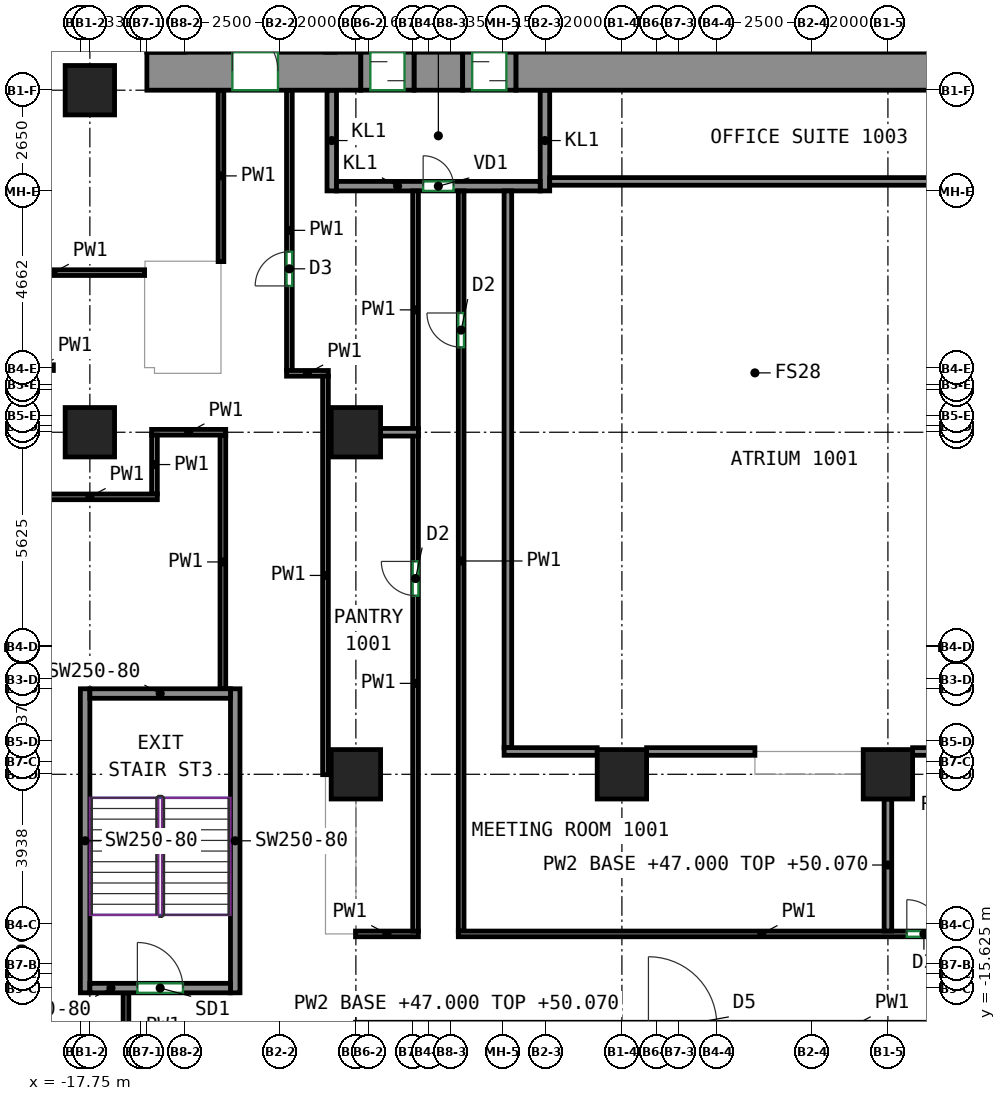
"""IFC4 building model, lengths in metres.
Left out: names, types, materials, properties, quantities, classifications, styles, units other than length and angle.
Written with IfcOpenShell. Run it as: python <this file> out.ifc"""

import sys

from ifc_helpers import new_model, si_unit, direction, frame, frame_2d, origin, origin_2d, place, context, subcontext, project, spatial, rectangle, extrude, source, transform, mapped, element, fill, save


model = new_model("IFC4")
c1 = context("Model", 3, precision=1e-05, world=origin(), true_north=direction((0.0, 1.0)))
c2 = subcontext(c1, "Body", "Model", "MODEL_VIEW")
j1 = project(units=[si_unit("LENGTHUNIT", "METRE"), si_unit("PLANEANGLEUNIT", "RADIAN")], contexts=[c1])
p1 = place(None, origin())
s1 = spatial("IfcSite", under=j1, at=p1, CompositionType="ELEMENT")
p2 = place(p1, origin())
s2 = spatial("IfcBuilding", under=s1, at=p2, CompositionType="ELEMENT")
p3 = place(p2, frame((0.0, 0.0, 47.0)))
s3 = spatial("IfcBuildingStorey", under=s2, at=p3, CompositionType="ELEMENT", Elevation=47.0)
m1 = source(origin(), c2, "Body", "SweptSolid", [
    extrude(rectangle(XDim=1.3, YDim=1.3, at=origin_2d()), origin(), (0.0, 0.0, 1.0), 3.72),
])
for number, where, z_axis, x_axis in (
    (1, (-17.5, -1.0, 0.0), (0.0, 0.0, 1.0), (1.0, 0.0, 0.0)),
    (2, (-17.5, 8.0, 0.0), (0.0, 0.0, 1.0), (1.0, 0.0, 0.0)),
    (3, (-10.5, -10.0, 0.0), (0.0, 0.0, 1.0), (1.0, 0.0, 0.0)),
    (4, (-10.5, -1.0, 0.0), (0.0, 0.0, 1.0), (1.0, 0.0, 0.0)),
    (5, (-3.5, -10.0, 0.0), (0.0, 0.0, 1.0), (1.0, 0.0, 0.0)),
    (6, (3.5, -10.0, 0.0), (0.0, 0.0, 1.0), (1.0, 0.0, 0.0)),
):
    element("IfcColumn", number, at=place(p3, frame(where, z_axis=z_axis, x_axis=x_axis)), inside=s3, PredefinedType="COLUMN", context=c2, shape_type="MappedRepresentation", body=[
        mapped(m1, transform((0.0, 0.0, 0.0))),
    ])
m2 = source(origin(), c2, "Body", "SweptSolid", [
    extrude(rectangle(XDim=5.63, YDim=1.0, at=frame_2d((2.815, 0.0))), origin(), (0.0, 0.0, 1.0), 3.72),
])
p4 = place(p3, frame((-16.0, 8.5, 0.0), z_axis=(0.0, 0.0, 1.0), x_axis=(1.0, 0.0, 0.0)))
e7 = element("IfcWall", 7, at=p4, inside=s3, PredefinedType="SHEAR", context=c2, shape_type="MappedRepresentation", body=[
    mapped(m2, transform((0.0, 0.0, 0.0))),
])
p5 = place(p4, frame((2.25, 0.0, 0.0)))
e8 = element("IfcOpeningElement", 8, at=p5, cuts=e7, PredefinedType="OPENING", context=c2, shape_type="SweptSolid", body=[
    extrude(rectangle(XDim=1.2, YDim=2.1, at=frame_2d((0.6, 1.05))), frame((0.0, 0.51, 0.0), z_axis=(0.0, -1.0, 0.0), x_axis=(1.0, 0.0, 0.0)), (0.0, 0.0, 1.0), 1.02),
])
m3 = source(origin(), c2, "Body", "SweptSolid", [
    extrude(rectangle(XDim=1.28, YDim=1.0, at=frame_2d((0.64, 0.0))), origin(), (0.0, 0.0, 1.0), 3.72),
])
p6 = place(p3, frame((-8.97, 8.5, 0.0), z_axis=(0.0, 0.0, 1.0), x_axis=(1.0, 0.0, 0.0)))
e9 = element("IfcWall", 9, at=p6, inside=s3, PredefinedType="SHEAR", context=c2, shape_type="MappedRepresentation", body=[
    mapped(m3, transform((0.0, 0.0, 0.0))),
])
m4 = source(origin(), c2, "Body", "SweptSolid", [
    extrude(rectangle(XDim=14.18, YDim=1.0, at=frame_2d((7.09, 0.0))), origin(), (0.0, 0.0, 1.0), 3.72),
])
p7 = place(p3, frame((-6.29, 8.5, 0.0), z_axis=(0.0, 0.0, 1.0), x_axis=(1.0, 0.0, 0.0)))
e10 = element("IfcWall", 10, at=p7, inside=s3, PredefinedType="SHEAR", context=c2, shape_type="MappedRepresentation", body=[
    mapped(m4, transform((0.0, 0.0, 0.0))),
])
m5 = source(origin(), c2, "Body", "SweptSolid", [
    extrude(rectangle(XDim=8.0, YDim=0.25, at=frame_2d((4.0, 0.0))), origin(), (0.0, 0.0, 1.0), 3.72),
])
for number, where, z_axis, x_axis in (
    (11, (-17.625, -15.75, 0.0), (0.0, 0.0, 1.0), (0.0, 1.0, 0.0)),
    (12, (-13.675, -15.75, 0.0), (0.0, 0.0, 1.0), (0.0, 1.0, 0.0)),
):
    element("IfcWall", number, at=place(p3, frame(where, z_axis=z_axis, x_axis=x_axis)), inside=s3, PredefinedType="SHEAR", context=c2, shape_type="MappedRepresentation", body=[
        mapped(m5, transform((0.0, 0.0, 0.0))),
    ])
m6 = source(origin(), c2, "Body", "SweptSolid", [
    extrude(rectangle(XDim=3.7, YDim=0.25, at=frame_2d((1.85, 0.0))), origin(), (0.0, 0.0, 1.0), 3.72),
])
p8 = place(p3, frame((-17.5, -15.625, 0.0), z_axis=(0.0, 0.0, 1.0), x_axis=(1.0, 0.0, 0.0)))
e13 = element("IfcWall", 13, at=p8, inside=s3, PredefinedType="SHEAR", context=c2, shape_type="MappedRepresentation", body=[
    mapped(m6, transform((0.0, 0.0, 0.0))),
])
p9 = place(p8, frame((1.25, 0.0, 0.0)))
e14 = element("IfcOpeningElement", 14, at=p9, cuts=e13, PredefinedType="OPENING", context=c2, shape_type="SweptSolid", body=[
    extrude(rectangle(XDim=1.2, YDim=2.1, at=frame_2d((0.6, 1.05))), frame((0.0, 0.135, 0.0), z_axis=(0.0, -1.0, 0.0), x_axis=(1.0, 0.0, 0.0)), (0.0, 0.0, 1.0), 0.27),
])
p10 = place(p3, frame((-17.5, -7.875, 0.0), z_axis=(0.0, 0.0, 1.0), x_axis=(1.0, 0.0, 0.0)))
e15 = element("IfcWall", 15, at=p10, inside=s3, PredefinedType="SHEAR", context=c2, shape_type="MappedRepresentation", body=[
    mapped(m6, transform((0.0, 0.0, 0.0))),
])
m7 = source(origin(), c2, "Body", "SweptSolid", [
    extrude(rectangle(XDim=2.65, YDim=0.25, at=frame_2d((1.325, 0.0))), origin(), (0.0, 0.0, 1.0), 3.72),
])
for number, where, z_axis, x_axis in (
    (16, (-11.135, 5.35, 0.0), (0.0, 0.0, 1.0), (0.0, 1.0, 0.0)),
    (17, (-5.525, 5.35, 0.0), (0.0, 0.0, 1.0), (0.0, 1.0, 0.0)),
):
    element("IfcWall", number, at=place(p3, frame(where, z_axis=z_axis, x_axis=x_axis)), inside=s3, PredefinedType="PARTITIONING", context=c2, shape_type="MappedRepresentation", body=[
        mapped(m7, transform((0.0, 0.0, 0.0))),
    ])
m8 = source(origin(), c2, "Body", "SweptSolid", [
    extrude(rectangle(XDim=5.36, YDim=0.25, at=frame_2d((2.68, 0.0))), origin(), (0.0, 0.0, 1.0), 3.72),
])
p11 = place(p3, frame((-11.01, 5.475, 0.0), z_axis=(0.0, 0.0, 1.0), x_axis=(1.0, 0.0, 0.0)))
e18 = element("IfcWall", 18, at=p11, inside=s3, PredefinedType="PARTITIONING", context=c2, shape_type="MappedRepresentation", body=[
    mapped(m8, transform((0.0, 0.0, 0.0))),
])
p12 = place(p11, frame((2.28, 0.0, 0.0)))
e19 = element("IfcOpeningElement", 19, at=p12, cuts=e18, PredefinedType="OPENING", context=c2, shape_type="SweptSolid", body=[
    extrude(rectangle(XDim=0.8, YDim=2.0, at=frame_2d((0.4, 1.0))), frame((0.0, 0.135, 0.0), z_axis=(0.0, -1.0, 0.0), x_axis=(1.0, 0.0, 0.0)), (0.0, 0.0, 1.0), 0.27),
])
m9 = source(origin(), c2, "Body", "SweptSolid", [
    extrude(rectangle(XDim=1.4, YDim=1.0, at=frame_2d((0.7, 0.0))), origin(), (0.0, 0.0, 1.0), 2.7),
])
p13 = place(p3, frame((-10.37, 8.5, 0.0), z_axis=(0.0, 0.0, 1.0), x_axis=(1.0, 0.0, 0.0)))
e20 = element("IfcWall", 20, at=p13, inside=s3, PredefinedType="PARTITIONING", context=c2, shape_type="MappedRepresentation", body=[
    mapped(m9, transform((0.0, 0.0, 0.0))),
])
p14 = place(p13, frame((0.25, 0.0, 0.0)))
e21 = element("IfcOpeningElement", 21, at=p14, cuts=e20, PredefinedType="OPENING", context=c2, shape_type="SweptSolid", body=[
    extrude(rectangle(XDim=0.9, YDim=2.1, at=frame_2d((0.45, 1.05))), frame((0.0, 0.51, 0.0), z_axis=(0.0, -1.0, 0.0), x_axis=(1.0, 0.0, 0.0)), (0.0, 0.0, 1.0), 1.02),
])
m10 = source(origin(), c2, "Body", "SweptSolid", [
    extrude(rectangle(XDim=1.4, YDim=1.0, at=frame_2d((0.7, 0.0))), origin(), (0.0, 0.0, 1.0), 2.7),
])
p15 = place(p3, frame((-7.69, 8.5, 0.0), z_axis=(0.0, 0.0, 1.0), x_axis=(1.0, 0.0, 0.0)))
e22 = element("IfcWall", 22, at=p15, inside=s3, PredefinedType="PARTITIONING", context=c2, shape_type="MappedRepresentation", body=[
    mapped(m10, transform((0.0, 0.0, 0.0))),
])
p16 = place(p15, frame((0.25, 0.0, 0.0)))
e23 = element("IfcOpeningElement", 23, at=p16, cuts=e22, PredefinedType="OPENING", context=c2, shape_type="SweptSolid", body=[
    extrude(rectangle(XDim=0.9, YDim=2.1, at=frame_2d((0.45, 1.05))), frame((0.0, 0.51, 0.0), z_axis=(0.0, -1.0, 0.0), x_axis=(1.0, 0.0, 0.0)), (0.0, 0.0, 1.0), 1.02),
])
p17 = place(p3, frame((-20.875, 3.2, 0.0), z_axis=(0.0, 0.0, 1.0), x_axis=(1.0, 0.0, 0.0)))
e24 = element("IfcWall", 24, at=p17, inside=s3, PredefinedType="PARTITIONING", context=c2, shape_type="SweptSolid", body=[
    extrude(rectangle(XDim=4.815, YDim=0.15, at=frame_2d((2.407, 0.0))), origin(), (0.0, 0.0, 1.0), 3.72),
])
p18 = place(p3, frame((-14.05, 8.0, 0.0), z_axis=(0.0, 0.0, 1.0), x_axis=(0.0, -1.0, 0.0)))
e25 = element("IfcWall", 25, at=p18, inside=s3, PredefinedType="PARTITIONING", context=c2, shape_type="SweptSolid", body=[
    extrude(rectangle(XDim=4.51, YDim=0.15, at=frame_2d((2.255, 0.0))), origin(), (0.0, 0.0, 1.0), 3.72),
])
p19 = place(p3, frame((-12.25, 0.625, 0.0), z_axis=(0.0, 0.0, 1.0), x_axis=(0.0, 1.0, 0.0)))
e26 = element("IfcWall", 26, at=p19, inside=s3, PredefinedType="PARTITIONING", context=c2, shape_type="SweptSolid", body=[
    extrude(rectangle(XDim=7.375, YDim=0.15, at=frame_2d((3.688, 0.0))), origin(), (0.0, 0.0, 1.0), 3.72),
])
p20 = place(p19, frame((2.225, 0.0, 0.0)))
e27 = element("IfcOpeningElement", 27, at=p20, cuts=e26, PredefinedType="OPENING", context=c2, shape_type="SweptSolid", body=[
    extrude(rectangle(XDim=0.9, YDim=2.1, at=frame_2d((0.45, 1.05))), frame((0.0, 0.085, 0.0), z_axis=(0.0, -1.0, 0.0), x_axis=(1.0, 0.0, 0.0)), (0.0, 0.0, 1.0), 0.17),
])
p21 = place(p3, frame((-12.325, 0.55, 0.0), z_axis=(0.0, 0.0, 1.0), x_axis=(1.0, 0.0, 0.0)))
e28 = element("IfcWall", 28, at=p21, inside=s3, PredefinedType="PARTITIONING", context=c2, shape_type="SweptSolid", body=[
    extrude(rectangle(XDim=1.1, YDim=0.15, at=frame_2d((0.55, 0.0))), origin(), (0.0, 0.0, 1.0), 3.72),
])
p22 = place(p3, frame((-8.93, -0.91, 0.0), z_axis=(0.0, 0.0, 1.0), x_axis=(0.0, 1.0, 0.0)))
e29 = element("IfcWall", 29, at=p22, inside=s3, PredefinedType="PARTITIONING", context=c2, shape_type="SweptSolid", body=[
    extrude(rectangle(XDim=6.26, YDim=0.15, at=frame_2d((3.13, 0.0))), origin(), (0.0, 0.0, 1.0), 3.72),
])
p23 = place(p3, frame((-7.73, -14.125, 0.0), z_axis=(0.0, 0.0, 1.0), x_axis=(0.0, 1.0, 0.0)))
e30 = element("IfcWall", 30, at=p23, inside=s3, PredefinedType="PARTITIONING", context=c2, shape_type="SweptSolid", body=[
    extrude(rectangle(XDim=19.475, YDim=0.15, at=frame_2d((9.738, 0.0))), origin(), (0.0, 0.0, 1.0), 3.72),
])
p24 = place(p23, frame((15.363, 0.0, 0.0)))
e31 = element("IfcOpeningElement", 31, at=p24, cuts=e30, PredefinedType="OPENING", context=c2, shape_type="SweptSolid", body=[
    extrude(rectangle(XDim=0.9, YDim=2.1, at=frame_2d((0.45, 1.05))), frame((0.0, 0.085, 0.0), z_axis=(0.0, -1.0, 0.0), x_axis=(1.0, 0.0, 0.0)), (0.0, 0.0, 1.0), 0.17),
])
p25 = place(p3, frame((-7.805, -14.2, 0.0), z_axis=(0.0, 0.0, 1.0), x_axis=(1.0, 0.0, 0.0)))
e32 = element("IfcWall", 32, at=p25, inside=s3, PredefinedType="PARTITIONING", context=c2, shape_type="SweptSolid", body=[
    extrude(rectangle(XDim=15.97, YDim=0.15, at=frame_2d((7.985, 0.0))), origin(), (0.0, 0.0, 1.0), 3.72),
])
p26 = place(p25, frame((11.802, 0.0, 0.0)))
e33 = element("IfcOpeningElement", 33, at=p26, cuts=e32, PredefinedType="OPENING", context=c2, shape_type="SweptSolid", body=[
    extrude(rectangle(XDim=0.9, YDim=2.1, at=frame_2d((0.45, 1.05))), frame((0.0, 0.085, 0.0), z_axis=(0.0, -1.0, 0.0), x_axis=(1.0, 0.0, 0.0)), (0.0, 0.0, 1.0), 0.17),
])
p27 = place(p3, frame((-11.3, -10.01, 0.0), z_axis=(0.0, 0.0, 1.0), x_axis=(0.0, 1.0, 0.0)))
e34 = element("IfcWall", 34, at=p27, inside=s3, PredefinedType="PARTITIONING", context=c2, shape_type="SweptSolid", body=[
    extrude(rectangle(XDim=10.485, YDim=0.15, at=frame_2d((5.243, 0.0))), origin(), (0.0, 0.0, 1.0), 3.72),
])
p28 = place(p3, frame((-10.51, -14.2, 0.0), z_axis=(0.0, 0.0, 1.0), x_axis=(1.0, 0.0, 0.0)))
e35 = element("IfcWall", 35, at=p28, inside=s3, PredefinedType="PARTITIONING", context=c2, shape_type="SweptSolid", body=[
    extrude(rectangle(XDim=1.655, YDim=0.15, at=frame_2d((0.828, 0.0))), origin(), (0.0, 0.0, 1.0), 3.72),
])
p29 = place(p3, frame((-8.93, -14.125, 0.0), z_axis=(0.0, 0.0, 1.0), x_axis=(0.0, 1.0, 0.0)))
e36 = element("IfcWall", 36, at=p29, inside=s3, PredefinedType="PARTITIONING", context=c2, shape_type="SweptSolid", body=[
    extrude(rectangle(XDim=13.035, YDim=0.15, at=frame_2d((6.518, 0.0))), origin(), (0.0, 0.0, 1.0), 3.72),
])
p30 = place(p29, frame((8.826, 0.0, 0.0)))
e37 = element("IfcOpeningElement", 37, at=p30, cuts=e36, PredefinedType="OPENING", context=c2, shape_type="SweptSolid", body=[
    extrude(rectangle(XDim=0.9, YDim=2.1, at=frame_2d((0.45, 1.05))), frame((0.0, 0.085, 0.0), z_axis=(0.0, -1.0, 0.0), x_axis=(1.0, 0.0, 0.0)), (0.0, 0.0, 1.0), 0.17),
])
p31 = place(p3, frame((-16.55, -15.75, 0.0), z_axis=(0.0, 0.0, 1.0), x_axis=(0.0, -1.0, 0.0)))
e38 = element("IfcWall", 38, at=p31, inside=s3, PredefinedType="PARTITIONING", context=c2, shape_type="SweptSolid", body=[
    extrude(rectangle(XDim=1.725, YDim=0.15, at=frame_2d((0.863, 0.0))), origin(), (0.0, 0.0, 1.0), 3.72),
])
p32 = place(p3, frame((-14.0, -1.075, 0.0), z_axis=(0.0, 0.0, 1.0), x_axis=(0.0, -1.0, 0.0)))
e39 = element("IfcWall", 39, at=p32, inside=s3, PredefinedType="PARTITIONING", context=c2, shape_type="SweptSolid", body=[
    extrude(rectangle(XDim=6.675, YDim=0.15, at=frame_2d((3.337, 0.0))), origin(), (0.0, 0.0, 1.0), 3.72),
])
p33 = place(p3, frame((-15.875, -1.0, 0.0), z_axis=(0.0, 0.0, 1.0), x_axis=(1.0, 0.0, 0.0)))
e40 = element("IfcWall", 40, at=p33, inside=s3, PredefinedType="PARTITIONING", context=c2, shape_type="SweptSolid", body=[
    extrude(rectangle(XDim=1.95, YDim=0.15, at=frame_2d((0.975, 0.0))), origin(), (0.0, 0.0, 1.0), 3.72),
])
p34 = place(p3, frame((-15.8, -2.625, 0.0), z_axis=(0.0, 0.0, 1.0), x_axis=(0.0, 1.0, 0.0)))
e41 = element("IfcWall", 41, at=p34, inside=s3, PredefinedType="PARTITIONING", context=c2, shape_type="SweptSolid", body=[
    extrude(rectangle(XDim=1.55, YDim=0.15, at=frame_2d((0.775, 0.0))), origin(), (0.0, 0.0, 1.0), 3.72),
])
p35 = place(p3, frame((-19.275, -2.7, 0.0), z_axis=(0.0, 0.0, 1.0), x_axis=(1.0, 0.0, 0.0)))
e42 = element("IfcWall", 42, at=p35, inside=s3, PredefinedType="PARTITIONING", context=c2, shape_type="SweptSolid", body=[
    extrude(rectangle(XDim=3.55, YDim=0.15, at=frame_2d((1.775, 0.0))), origin(), (0.0, 0.0, 1.0), 3.72),
])
p36 = place(p3, frame((-19.275, 0.7, 0.0), z_axis=(0.0, 0.0, 1.0), x_axis=(1.0, 0.0, 0.0)))
e43 = element("IfcWall", 43, at=p36, inside=s3, PredefinedType="PARTITIONING", context=c2, shape_type="SweptSolid", body=[
    extrude(rectangle(XDim=0.815, YDim=0.15, at=frame_2d((0.407, 0.0))), origin(), (0.0, 0.0, 1.0), 3.72),
])
p37 = place(p3, frame((-9.85, -1.0, 0.0), z_axis=(0.0, 0.0, 1.0), x_axis=(1.0, 0.0, 0.0)))
e44 = element("IfcWall", 44, at=p37, inside=s3, PredefinedType="PARTITIONING", context=c2, shape_type="SweptSolid", body=[
    extrude(rectangle(XDim=0.994, YDim=0.2, at=frame_2d((0.497, 0.0))), origin(), (0.0, 0.0, 1.0), 3.72),
])
p38 = place(p3, frame((3.5, -14.124, 0.0), z_axis=(0.0, 0.0, 1.0), x_axis=(0.0, 1.0, 0.0)))
e45 = element("IfcWall", 45, at=p38, inside=s3, PredefinedType="PARTITIONING", context=c2, shape_type="SweptSolid", body=[
    extrude(rectangle(XDim=3.474, YDim=0.2, at=frame_2d((1.737, 0.0))), origin(), (0.0, 0.0, 1.0), 3.07),
])
p39 = place(p3, frame((-6.5, -9.3, 0.0), z_axis=(0.0, 0.0, 1.0), x_axis=(0.0, 1.0, 0.0)))
e46 = element("IfcWall", 46, at=p39, inside=s3, PredefinedType="PARTITIONING", context=c2, shape_type="SweptSolid", body=[
    extrude(rectangle(XDim=14.65, YDim=0.2, at=frame_2d((7.325, 0.0))), origin(), (0.0, 0.0, 1.0), 3.72),
])
p40 = place(p3, frame((-6.6, -9.4, 0.0), z_axis=(0.0, 0.0, 1.0), x_axis=(1.0, 0.0, 0.0)))
e47 = element("IfcWall", 47, at=p40, inside=s3, PredefinedType="PARTITIONING", context=c2, shape_type="SweptSolid", body=[
    extrude(rectangle(XDim=2.45, YDim=0.2, at=frame_2d((1.225, 0.0))), origin(), (0.0, 0.0, 1.0), 3.72),
])
p41 = place(p3, frame((-2.85, -9.4, 0.0), z_axis=(0.0, 0.0, 1.0), x_axis=(1.0, 0.0, 0.0)))
e48 = element("IfcWall", 48, at=p41, inside=s3, PredefinedType="PARTITIONING", context=c2, shape_type="SweptSolid", body=[
    extrude(rectangle(XDim=2.85, YDim=0.2, at=frame_2d((1.425, 0.0))), origin(), (0.0, 0.0, 1.0), 3.72),
])
p42 = place(p3, frame((4.15, -9.4, 0.0), z_axis=(0.0, 0.0, 1.0), x_axis=(1.0, 0.0, 0.0)))
e49 = element("IfcWall", 49, at=p42, inside=s3, PredefinedType="PARTITIONING", context=c2, shape_type="SweptSolid", body=[
    extrude(rectangle(XDim=3.939, YDim=0.2, at=frame_2d((1.97, 0.0))), origin(), (0.0, 0.0, 1.0), 3.72),
])
p43 = place(p3, frame((-5.4, 5.6, 0.0), z_axis=(0.0, 0.0, 1.0), x_axis=(1.0, 0.0, 0.0)))
e50 = element("IfcWall", 50, at=p43, inside=s3, PredefinedType="PARTITIONING", context=c2, shape_type="SweptSolid", body=[
    extrude(rectangle(XDim=13.489, YDim=0.2, at=frame_2d((6.745, 0.0))), origin(), (0.0, 0.0, 1.0), 3.72),
])
p44 = place(p12, origin())
e51 = element("IfcDoor", 51, at=p44, inside=s3, OperationType="SINGLE_SWING_LEFT", PredefinedType="DOOR", context=c2, shape_type="SweptSolid", body=[
    extrude(rectangle(XDim=0.8, YDim=2.0, at=frame_2d((0.4, 1.0))), frame((0.0, 0.025, 0.0), z_axis=(0.0, -1.0, 0.0), x_axis=(1.0, 0.0, 0.0)), (0.0, 0.0, 1.0), 0.05),
])
fill(e19, e51)
p45 = place(p14, origin())
e52 = element("IfcDoor", 52, at=p45, inside=s3, OperationType="SLIDING_TO_LEFT", PredefinedType="DOOR", context=c2, shape_type="SweptSolid", body=[
    extrude(rectangle(XDim=0.9, YDim=2.1, at=frame_2d((0.45, 1.05))), frame((0.0, 0.405, 0.0), z_axis=(0.0, -1.0, 0.0), x_axis=(1.0, 0.0, 0.0)), (0.0, 0.0, 1.0), 0.05),
])
fill(e21, e52)
p46 = place(p16, origin())
e53 = element("IfcDoor", 53, at=p46, inside=s3, OperationType="SLIDING_TO_RIGHT", PredefinedType="DOOR", context=c2, shape_type="SweptSolid", body=[
    extrude(rectangle(XDim=0.9, YDim=2.1, at=frame_2d((0.45, 1.05))), frame((0.0, 0.405, 0.0), z_axis=(0.0, -1.0, 0.0), x_axis=(1.0, 0.0, 0.0)), (0.0, 0.0, 1.0), 0.05),
])
fill(e23, e53)
p47 = place(p5, origin())
e54 = element("IfcDoor", 54, at=p47, inside=s3, OperationType="DOUBLE_DOOR_SINGLE_SWING", PredefinedType="DOOR", context=c2, shape_type="SweptSolid", body=[
    extrude(rectangle(XDim=1.2, YDim=2.1, at=frame_2d((0.6, 1.05))), frame((0.0, 0.405, 0.0), z_axis=(0.0, -1.0, 0.0), x_axis=(1.0, 0.0, 0.0)), (0.0, 0.0, 1.0), 0.05),
])
fill(e8, e54)
p48 = place(p9, origin())
e55 = element("IfcDoor", 55, at=p48, inside=s3, OperationType="DOUBLE_DOOR_SINGLE_SWING", PredefinedType="DOOR", context=c2, shape_type="SweptSolid", body=[
    extrude(rectangle(XDim=1.2, YDim=2.1, at=frame_2d((0.6, 1.05))), frame((0.0, 0.025, 0.0), z_axis=(0.0, -1.0, 0.0), x_axis=(1.0, 0.0, 0.0)), (0.0, 0.0, 1.0), 0.05),
])
fill(e14, e55)
p49 = place(p26, origin())
e56 = element("IfcDoor", 56, at=p49, inside=s3, OperationType="SINGLE_SWING_LEFT", PredefinedType="DOOR", context=c2, shape_type="SweptSolid", body=[
    extrude(rectangle(XDim=0.9, YDim=2.1, at=frame_2d((0.45, 1.05))), frame((0.0, 0.025, 0.0), z_axis=(0.0, -1.0, 0.0), x_axis=(1.0, 0.0, 0.0)), (0.0, 0.0, 1.0), 0.05),
])
fill(e33, e56)
p50 = place(p30, origin())
e57 = element("IfcDoor", 57, at=p50, inside=s3, OperationType="SINGLE_SWING_RIGHT", PredefinedType="DOOR", context=c2, shape_type="SweptSolid", body=[
    extrude(rectangle(XDim=0.9, YDim=2.1, at=frame_2d((0.45, 1.05))), frame((0.0, 0.025, 0.0), z_axis=(0.0, -1.0, 0.0), x_axis=(1.0, 0.0, 0.0)), (0.0, 0.0, 1.0), 0.05),
])
fill(e37, e57)
p51 = place(p24, origin())
e58 = element("IfcDoor", 58, at=p51, inside=s3, OperationType="SINGLE_SWING_RIGHT", PredefinedType="DOOR", context=c2, shape_type="SweptSolid", body=[
    extrude(rectangle(XDim=0.9, YDim=2.1, at=frame_2d((0.45, 1.05))), frame((0.0, 0.025, 0.0), z_axis=(0.0, -1.0, 0.0), x_axis=(1.0, 0.0, 0.0)), (0.0, 0.0, 1.0), 0.05),
])
fill(e31, e58)
p52 = place(p20, origin())
e59 = element("IfcDoor", 59, at=p52, inside=s3, OperationType="SINGLE_SWING_LEFT", PredefinedType="DOOR", context=c2, shape_type="SweptSolid", body=[
    extrude(rectangle(XDim=0.9, YDim=2.1, at=frame_2d((0.45, 1.05))), frame((0.0, 0.025, 0.0), z_axis=(0.0, -1.0, 0.0), x_axis=(1.0, 0.0, 0.0)), (0.0, 0.0, 1.0), 0.05),
])
fill(e27, e59)
save(model, sys.argv[1])
